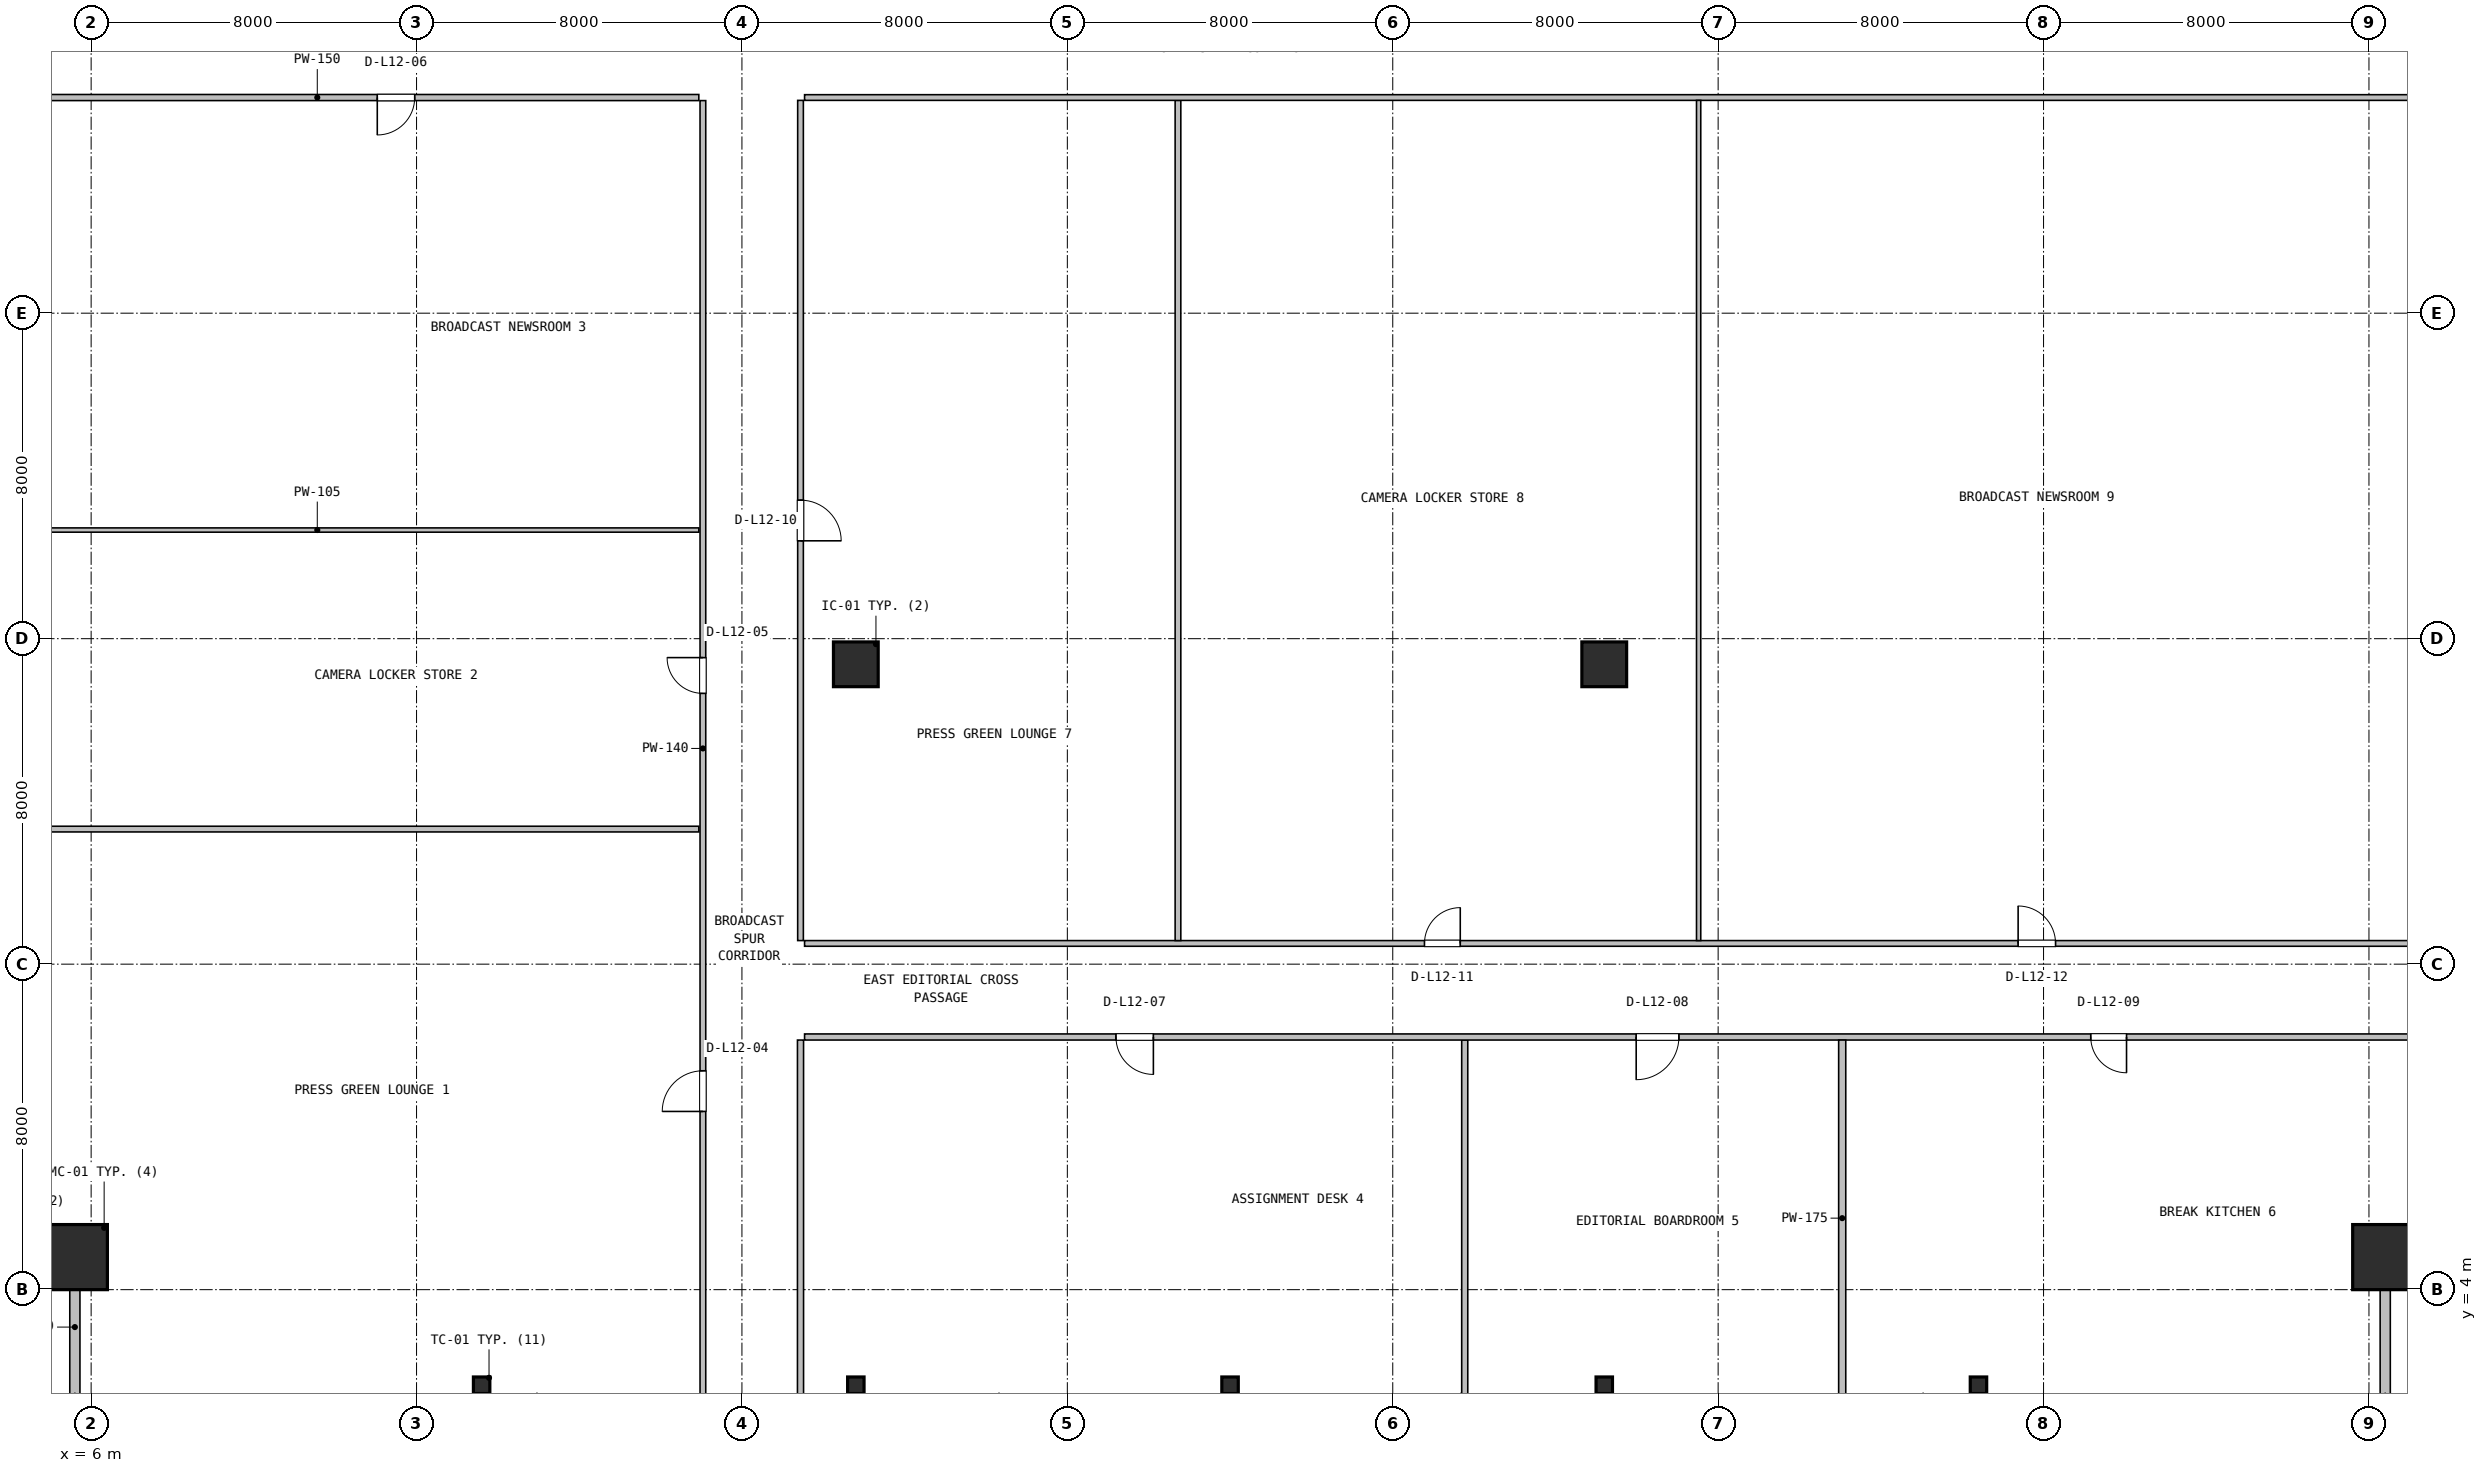
"""IFC4 building model, lengths in metres.
Left out: names, types, materials, properties, quantities, classifications, styles, units other than length and angle.
Written with IfcOpenShell. Run it as: python <this file> out.ifc"""

import sys

from ifc_helpers import new_model, si_unit, direction, frame, frame_2d, origin, origin_2d, place, context, subcontext, project, spatial, rectangle, hollow_rectangle, i_section, extrude, source, transform, mapped, element, fill, save


model = new_model("IFC4")
c1 = context("Model", 3, precision=1e-05, world=origin(), true_north=direction((0.0, 1.0)))
c2 = subcontext(c1, "Body", "Model", "MODEL_VIEW")
j1 = project(units=[si_unit("LENGTHUNIT", "METRE"), si_unit("PLANEANGLEUNIT", "RADIAN")], contexts=[c1])
p1 = place(None, origin())
s1 = spatial("IfcSite", under=j1, at=p1, CompositionType="ELEMENT")
p2 = place(p1, origin())
s2 = spatial("IfcBuilding", under=s1, at=p2, CompositionType="ELEMENT")
p3 = place(p2, frame((0.0, 0.0, 54.9)))
s3 = spatial("IfcBuildingStorey", under=s2, at=p3, CompositionType="ELEMENT", Elevation=54.9)
m1 = source(origin(), c2, "Body", "SweptSolid", [
    extrude(hollow_rectangle(XDim=1.6, YDim=1.6, WallThickness=0.06, at=origin_2d()), origin(), (0.0, 0.0, 1.0), 3.9),
])
for number, where, z_axis, x_axis in (
    (1, (5.6, 4.8, 0.0), (0.0, 0.0, 1.0), (1.0, 0.0, 0.0)),
    (2, (62.4, 4.8, 0.0), (0.0, 0.0, 1.0), (1.0, 0.0, 0.0)),
):
    element("IfcColumn", number, at=place(p3, frame(where, z_axis=z_axis, x_axis=x_axis)), inside=s3, PredefinedType="COLUMN", context=c2, shape_type="MappedRepresentation", body=[
        mapped(m1, transform((0.0, 0.0, 0.0), x_axis=(1.0, 0.0, 0.0), y_axis=(0.0, 1.0, 0.0), z_axis=(0.0, 0.0, 1.0), scale=1.0)),
    ])
m2 = source(origin(), c2, "Body", "SweptSolid", [
    extrude(i_section(OverallWidth=0.404, OverallDepth=0.407, WebThickness=0.027, FlangeThickness=0.044, FilletRadius=0.018, at=origin_2d()), origin(), (0.0, 0.0, 1.0), 3.9),
])
for number, where, z_axis, x_axis in (
    (3, (15.6, 1.65, 0.0), (0.0, 0.0, 1.0), (1.0, 0.0, 0.0)),
    (4, (24.8, 1.65, 0.0), (0.0, 0.0, 1.0), (1.0, 0.0, 0.0)),
    (5, (34.0, 1.65, 0.0), (0.0, 0.0, 1.0), (1.0, 0.0, 0.0)),
    (6, (43.2, 1.65, 0.0), (0.0, 0.0, 1.0), (1.0, 0.0, 0.0)),
    (7, (52.4, 1.65, 0.0), (0.0, 0.0, 1.0), (1.0, 0.0, 0.0)),
):
    element("IfcColumn", number, at=place(p3, frame(where, z_axis=z_axis, x_axis=x_axis)), inside=s3, PredefinedType="COLUMN", context=c2, shape_type="MappedRepresentation", body=[
        mapped(m2, transform((0.0, 0.0, 0.0), x_axis=(1.0, 0.0, 0.0), y_axis=(0.0, 1.0, 0.0), z_axis=(0.0, 0.0, 1.0), scale=1.0)),
    ])
m3 = source(origin(), c2, "Body", "SweptSolid", [
    extrude(rectangle(XDim=1.1, YDim=1.1, at=origin_2d()), origin(), (0.0, 0.0, 1.0), 3.9),
])
for number, where, z_axis, x_axis in (
    (8, (24.8, 19.37, 0.0), (0.0, 0.0, 1.0), (1.0, 0.0, 0.0)),
    (9, (43.2, 19.37, 0.0), (0.0, 0.0, 1.0), (1.0, 0.0, 0.0)),
):
    element("IfcColumn", number, at=place(p3, frame(where, z_axis=z_axis, x_axis=x_axis)), inside=s3, PredefinedType="COLUMN", context=c2, shape_type="MappedRepresentation", body=[
        mapped(m3, transform((0.0, 0.0, 0.0), x_axis=(1.0, 0.0, 0.0), y_axis=(0.0, 1.0, 0.0), z_axis=(0.0, 0.0, 1.0), scale=1.0)),
    ])
for number, where, z_axis, x_axis in (
    (10, (5.6, 1.28, 0.0), (0.0, 0.0, 1.0), (0.0, 1.0, 0.0)),
    (11, (62.4, 1.28, 0.0), (0.0, 0.0, 1.0), (0.0, 1.0, 0.0)),
):
    element("IfcWall", number, at=place(p3, frame(where, z_axis=z_axis, x_axis=x_axis)), inside=s3, PredefinedType="SOLIDWALL", context=c2, shape_type="SweptSolid", body=[
        extrude(rectangle(XDim=3.6, YDim=0.25, at=frame_2d((1.8, 0.0))), origin(), (0.0, 0.0, 1.0), 3.208),
    ])
p4 = place(p3, frame((21.04, 1.38, 0.0), z_axis=(0.0, 0.0, 1.0), x_axis=(0.0, 1.0, 0.0)))
e12 = element("IfcWall", 12, at=p4, inside=s3, PredefinedType="PARTITIONING", context=c2, shape_type="SweptSolid", body=[
    extrude(rectangle(XDim=31.845, YDim=0.14, at=frame_2d((15.923, 0.0))), origin(), (0.0, 0.0, 1.0), 3.208),
])
p5 = place(p4, frame((7.0, 0.0, 0.0)))
e13 = element("IfcOpeningElement", 13, at=p5, cuts=e12, PredefinedType="OPENING", context=c2, shape_type="SweptSolid", body=[
    extrude(rectangle(XDim=1.0, YDim=2.1, at=frame_2d((0.5, 1.05))), frame((0.0, 0.08, 0.0), z_axis=(0.0, -1.0, 0.0), x_axis=(1.0, 0.0, 0.0)), (0.0, 0.0, 1.0), 0.16),
])
p6 = place(p4, frame((17.275, 0.0, 0.0)))
e14 = element("IfcOpeningElement", 14, at=p6, cuts=e12, PredefinedType="OPENING", context=c2, shape_type="SweptSolid", body=[
    extrude(rectangle(XDim=0.88, YDim=2.06, at=frame_2d((0.44, 1.03))), frame((0.0, 0.08, 0.0), z_axis=(0.0, -1.0, 0.0), x_axis=(1.0, 0.0, 0.0)), (0.0, 0.0, 1.0), 0.16),
])
p7 = place(p3, frame((2.18, 15.32, 0.0), z_axis=(0.0, 0.0, 1.0), x_axis=(1.0, 0.0, 0.0)))
e15 = element("IfcWall", 15, at=p7, inside=s3, PredefinedType="PARTITIONING", context=c2, shape_type="SweptSolid", body=[
    extrude(rectangle(XDim=18.76, YDim=0.14, at=frame_2d((9.38, 0.0))), origin(), (0.0, 0.0, 1.0), 3.208),
])
p8 = place(p3, frame((2.18, 22.67, 0.0), z_axis=(0.0, 0.0, 1.0), x_axis=(1.0, 0.0, 0.0)))
e16 = element("IfcWall", 16, at=p8, inside=s3, PredefinedType="PARTITIONING", context=c2, shape_type="SweptSolid", body=[
    extrude(rectangle(XDim=18.76, YDim=0.105, at=frame_2d((9.38, 0.0))), origin(), (0.0, 0.0, 1.0), 3.208),
])
p9 = place(p3, frame((2.18, 33.3, 0.0), z_axis=(0.0, 0.0, 1.0), x_axis=(1.0, 0.0, 0.0)))
e17 = element("IfcWall", 17, at=p9, inside=s3, PredefinedType="PARTITIONING", context=c2, shape_type="SweptSolid", body=[
    extrude(rectangle(XDim=18.76, YDim=0.15, at=frame_2d((9.38, 0.0))), origin(), (0.0, 0.0, 1.0), 3.208),
])
p10 = place(p9, frame((10.855, 0.0, 0.0)))
e18 = element("IfcOpeningElement", 18, at=p10, cuts=e17, PredefinedType="OPENING", context=c2, shape_type="SweptSolid", body=[
    extrude(rectangle(XDim=0.92, YDim=2.08, at=frame_2d((0.46, 1.04))), frame((0.0, 0.085, 0.0), z_axis=(0.0, -1.0, 0.0), x_axis=(1.0, 0.0, 0.0)), (0.0, 0.0, 1.0), 0.17),
])
p11 = place(p3, frame((39.77, 1.38, 0.0), z_axis=(0.0, 0.0, 1.0), x_axis=(0.0, 1.0, 0.0)))
e19 = element("IfcWall", 19, at=p11, inside=s3, PredefinedType="PARTITIONING", context=c2, shape_type="SweptSolid", body=[
    extrude(rectangle(XDim=8.755, YDim=0.15, at=frame_2d((4.377, 0.0))), origin(), (0.0, 0.0, 1.0), 3.208),
])
p12 = place(p3, frame((23.54, 10.21, 0.0), z_axis=(0.0, 0.0, 1.0), x_axis=(1.0, 0.0, 0.0)))
e20 = element("IfcWall", 20, at=p12, inside=s3, PredefinedType="PARTITIONING", context=c2, shape_type="SweptSolid", body=[
    extrude(rectangle(XDim=42.28, YDim=0.15, at=frame_2d((21.14, 0.0))), origin(), (0.0, 0.0, 1.0), 2.852),
])
p13 = place(p12, frame((7.655, 0.0, 0.0)))
e21 = element("IfcOpeningElement", 21, at=p13, cuts=e20, PredefinedType="OPENING", context=c2, shape_type="SweptSolid", body=[
    extrude(rectangle(XDim=0.92, YDim=2.08, at=frame_2d((0.46, 1.04))), frame((0.0, 0.085, 0.0), z_axis=(0.0, -1.0, 0.0), x_axis=(1.0, 0.0, 0.0)), (0.0, 0.0, 1.0), 0.17),
])
p14 = place(p12, frame((20.445, 0.0, 0.0)))
e22 = element("IfcOpeningElement", 22, at=p14, cuts=e20, PredefinedType="OPENING", context=c2, shape_type="SweptSolid", body=[
    extrude(rectangle(XDim=1.05, YDim=2.1, at=frame_2d((0.525, 1.05))), frame((0.0, 0.085, 0.0), z_axis=(0.0, -1.0, 0.0), x_axis=(1.0, 0.0, 0.0)), (0.0, 0.0, 1.0), 0.17),
])
p15 = place(p12, frame((31.62, 0.0, 0.0)))
e23 = element("IfcOpeningElement", 23, at=p15, cuts=e20, PredefinedType="OPENING", context=c2, shape_type="SweptSolid", body=[
    extrude(rectangle(XDim=0.88, YDim=2.06, at=frame_2d((0.44, 1.03))), frame((0.0, 0.085, 0.0), z_axis=(0.0, -1.0, 0.0), x_axis=(1.0, 0.0, 0.0)), (0.0, 0.0, 1.0), 0.17),
])
p16 = place(p3, frame((23.44, 1.38, 0.0), z_axis=(0.0, 0.0, 1.0), x_axis=(0.0, 1.0, 0.0)))
e24 = element("IfcWall", 24, at=p16, inside=s3, PredefinedType="PARTITIONING", context=c2, shape_type="SweptSolid", body=[
    extrude(rectangle(XDim=8.755, YDim=0.15, at=frame_2d((4.377, 0.0))), origin(), (0.0, 0.0, 1.0), 3.208),
])
p17 = place(p3, frame((49.05, 1.38, 0.0), z_axis=(0.0, 0.0, 1.0), x_axis=(0.0, 1.0, 0.0)))
e25 = element("IfcWall", 25, at=p17, inside=s3, PredefinedType="PARTITIONING", context=c2, shape_type="SweptSolid", body=[
    extrude(rectangle(XDim=8.755, YDim=0.175, at=frame_2d((4.377, 0.0))), origin(), (0.0, 0.0, 1.0), 3.208),
])
p18 = place(p3, frame((23.54, 12.51, 0.0), z_axis=(0.0, 0.0, 1.0), x_axis=(1.0, 0.0, 0.0)))
e26 = element("IfcWall", 26, at=p18, inside=s3, PredefinedType="PARTITIONING", context=c2, shape_type="SweptSolid", body=[
    extrude(rectangle(XDim=42.28, YDim=0.14, at=frame_2d((21.14, 0.0))), origin(), (0.0, 0.0, 1.0), 2.852),
])
p19 = place(p18, frame((15.24, 0.0, 0.0)))
e27 = element("IfcOpeningElement", 27, at=p19, cuts=e26, PredefinedType="OPENING", context=c2, shape_type="SweptSolid", body=[
    extrude(rectangle(XDim=0.88, YDim=2.06, at=frame_2d((0.44, 1.03))), frame((0.0, 0.08, 0.0), z_axis=(0.0, -1.0, 0.0), x_axis=(1.0, 0.0, 0.0)), (0.0, 0.0, 1.0), 0.16),
])
p20 = place(p18, frame((29.835, 0.0, 0.0)))
e28 = element("IfcOpeningElement", 28, at=p20, cuts=e26, PredefinedType="OPENING", context=c2, shape_type="SweptSolid", body=[
    extrude(rectangle(XDim=0.92, YDim=2.08, at=frame_2d((0.46, 1.04))), frame((0.0, 0.08, 0.0), z_axis=(0.0, -1.0, 0.0), x_axis=(1.0, 0.0, 0.0)), (0.0, 0.0, 1.0), 0.16),
])
p21 = place(p3, frame((32.72, 12.58, 0.0), z_axis=(0.0, 0.0, 1.0), x_axis=(0.0, 1.0, 0.0)))
e29 = element("IfcWall", 29, at=p21, inside=s3, PredefinedType="PARTITIONING", context=c2, shape_type="SweptSolid", body=[
    extrude(rectangle(XDim=20.65, YDim=0.14, at=frame_2d((10.325, 0.0))), origin(), (0.0, 0.0, 1.0), 2.852),
])
p22 = place(p3, frame((23.54, 33.3, 0.0), z_axis=(0.0, 0.0, 1.0), x_axis=(1.0, 0.0, 0.0)))
e30 = element("IfcWall", 30, at=p22, inside=s3, PredefinedType="PARTITIONING", context=c2, shape_type="SweptSolid", body=[
    extrude(rectangle(XDim=42.28, YDim=0.14, at=frame_2d((21.14, 0.0))), origin(), (0.0, 0.0, 1.0), 2.852),
])
p23 = place(p3, frame((23.44, 12.58, 0.0), z_axis=(0.0, 0.0, 1.0), x_axis=(0.0, 1.0, 0.0)))
e31 = element("IfcWall", 31, at=p23, inside=s3, PredefinedType="PARTITIONING", context=c2, shape_type="SweptSolid", body=[
    extrude(rectangle(XDim=20.65, YDim=0.14, at=frame_2d((10.325, 0.0))), origin(), (0.0, 0.0, 1.0), 3.322),
])
p24 = place(p23, frame((9.825, 0.0, 0.0)))
e32 = element("IfcOpeningElement", 32, at=p24, cuts=e31, PredefinedType="OPENING", context=c2, shape_type="SweptSolid", body=[
    extrude(rectangle(XDim=1.0, YDim=2.1, at=frame_2d((0.5, 1.05))), frame((0.0, 0.08, 0.0), z_axis=(0.0, -1.0, 0.0), x_axis=(1.0, 0.0, 0.0)), (0.0, 0.0, 1.0), 0.16),
])
p25 = place(p3, frame((45.52, 12.58, 0.0), z_axis=(0.0, 0.0, 1.0), x_axis=(0.0, 1.0, 0.0)))
e33 = element("IfcWall", 33, at=p25, inside=s3, PredefinedType="PARTITIONING", context=c2, shape_type="SweptSolid", body=[
    extrude(rectangle(XDim=20.65, YDim=0.105, at=frame_2d((10.325, 0.0))), origin(), (0.0, 0.0, 1.0), 3.322),
])
m4 = source(origin(), c2, "Body", "SweptSolid", [
    extrude(rectangle(XDim=1.0, YDim=2.1, at=frame_2d((0.5, 1.05))), frame((0.0, 0.025, 0.0), z_axis=(0.0, -1.0, 0.0), x_axis=(1.0, 0.0, 0.0)), (0.0, 0.0, 1.0), 0.05),
])
p26 = place(p5, origin())
e34 = element("IfcDoor", 34, at=p26, inside=s3, OperationType="SINGLE_SWING_LEFT", PredefinedType="DOOR", context=c2, shape_type="MappedRepresentation", body=[
    mapped(m4, transform((0.0, 0.0, 0.0), x_axis=(1.0, 0.0, 0.0), y_axis=(0.0, 1.0, 0.0), z_axis=(0.0, 0.0, 1.0), scale=1.0)),
])
fill(e13, e34)
m5 = source(origin(), c2, "Body", "SweptSolid", [
    extrude(rectangle(XDim=0.88, YDim=2.06, at=frame_2d((0.44, 1.03))), frame((0.0, 0.025, 0.0), z_axis=(0.0, -1.0, 0.0), x_axis=(1.0, 0.0, 0.0)), (0.0, 0.0, 1.0), 0.05),
])
p27 = place(p6, origin())
e35 = element("IfcDoor", 35, at=p27, inside=s3, OperationType="SINGLE_SWING_RIGHT", PredefinedType="DOOR", context=c2, shape_type="MappedRepresentation", body=[
    mapped(m5, transform((0.0, 0.0, 0.0), x_axis=(1.0, 0.0, 0.0), y_axis=(0.0, 1.0, 0.0), z_axis=(0.0, 0.0, 1.0), scale=1.0)),
])
fill(e14, e35)
m6 = source(origin(), c2, "Body", "SweptSolid", [
    extrude(rectangle(XDim=0.92, YDim=2.08, at=frame_2d((0.46, 1.04))), frame((0.0, 0.025, 0.0), z_axis=(0.0, -1.0, 0.0), x_axis=(1.0, 0.0, 0.0)), (0.0, 0.0, 1.0), 0.05),
])
p28 = place(p10, frame((0.92, 0.0, 0.0), z_axis=(0.0, 0.0, 1.0), x_axis=(-1.0, 0.0, 0.0)))
e36 = element("IfcDoor", 36, at=p28, inside=s3, OperationType="SINGLE_SWING_LEFT", PredefinedType="DOOR", context=c2, shape_type="MappedRepresentation", body=[
    mapped(m6, transform((0.0, 0.0, 0.0), x_axis=(1.0, 0.0, 0.0), y_axis=(0.0, 1.0, 0.0), z_axis=(0.0, 0.0, 1.0), scale=1.0)),
])
fill(e18, e36)
p29 = place(p13, frame((0.92, 0.0, 0.0), z_axis=(0.0, 0.0, 1.0), x_axis=(-1.0, 0.0, 0.0)))
e37 = element("IfcDoor", 37, at=p29, inside=s3, OperationType="SINGLE_SWING_RIGHT", PredefinedType="DOOR", context=c2, shape_type="MappedRepresentation", body=[
    mapped(m6, transform((0.0, 0.0, 0.0), x_axis=(1.0, 0.0, 0.0), y_axis=(0.0, 1.0, 0.0), z_axis=(0.0, 0.0, 1.0), scale=1.0)),
])
fill(e21, e37)
m7 = source(origin(), c2, "Body", "SweptSolid", [
    extrude(rectangle(XDim=1.05, YDim=2.1, at=frame_2d((0.525, 1.05))), frame((0.0, 0.025, 0.0), z_axis=(0.0, -1.0, 0.0), x_axis=(1.0, 0.0, 0.0)), (0.0, 0.0, 1.0), 0.05),
])
p30 = place(p14, frame((1.05, 0.0, 0.0), z_axis=(0.0, 0.0, 1.0), x_axis=(-1.0, 0.0, 0.0)))
e38 = element("IfcDoor", 38, at=p30, inside=s3, OperationType="SINGLE_SWING_LEFT", PredefinedType="DOOR", context=c2, shape_type="MappedRepresentation", body=[
    mapped(m7, transform((0.0, 0.0, 0.0), x_axis=(1.0, 0.0, 0.0), y_axis=(0.0, 1.0, 0.0), z_axis=(0.0, 0.0, 1.0), scale=1.0)),
])
fill(e22, e38)
p31 = place(p15, frame((0.88, 0.0, 0.0), z_axis=(0.0, 0.0, 1.0), x_axis=(-1.0, 0.0, 0.0)))
e39 = element("IfcDoor", 39, at=p31, inside=s3, OperationType="SINGLE_SWING_RIGHT", PredefinedType="DOOR", context=c2, shape_type="MappedRepresentation", body=[
    mapped(m5, transform((0.0, 0.0, 0.0), x_axis=(1.0, 0.0, 0.0), y_axis=(0.0, 1.0, 0.0), z_axis=(0.0, 0.0, 1.0), scale=1.0)),
])
fill(e23, e39)
p32 = place(p24, frame((1.0, 0.0, 0.0), z_axis=(0.0, 0.0, 1.0), x_axis=(-1.0, 0.0, 0.0)))
e40 = element("IfcDoor", 40, at=p32, inside=s3, OperationType="SINGLE_SWING_LEFT", PredefinedType="DOOR", context=c2, shape_type="MappedRepresentation", body=[
    mapped(m4, transform((0.0, 0.0, 0.0), x_axis=(1.0, 0.0, 0.0), y_axis=(0.0, 1.0, 0.0), z_axis=(0.0, 0.0, 1.0), scale=1.0)),
])
fill(e32, e40)
p33 = place(p19, origin())
e41 = element("IfcDoor", 41, at=p33, inside=s3, OperationType="SINGLE_SWING_RIGHT", PredefinedType="DOOR", context=c2, shape_type="MappedRepresentation", body=[
    mapped(m5, transform((0.0, 0.0, 0.0), x_axis=(1.0, 0.0, 0.0), y_axis=(0.0, 1.0, 0.0), z_axis=(0.0, 0.0, 1.0), scale=1.0)),
])
fill(e27, e41)
p34 = place(p20, origin())
e42 = element("IfcDoor", 42, at=p34, inside=s3, OperationType="SINGLE_SWING_LEFT", PredefinedType="DOOR", context=c2, shape_type="MappedRepresentation", body=[
    mapped(m6, transform((0.0, 0.0, 0.0), x_axis=(1.0, 0.0, 0.0), y_axis=(0.0, 1.0, 0.0), z_axis=(0.0, 0.0, 1.0), scale=1.0)),
])
fill(e28, e42)
save(model, sys.argv[1])
